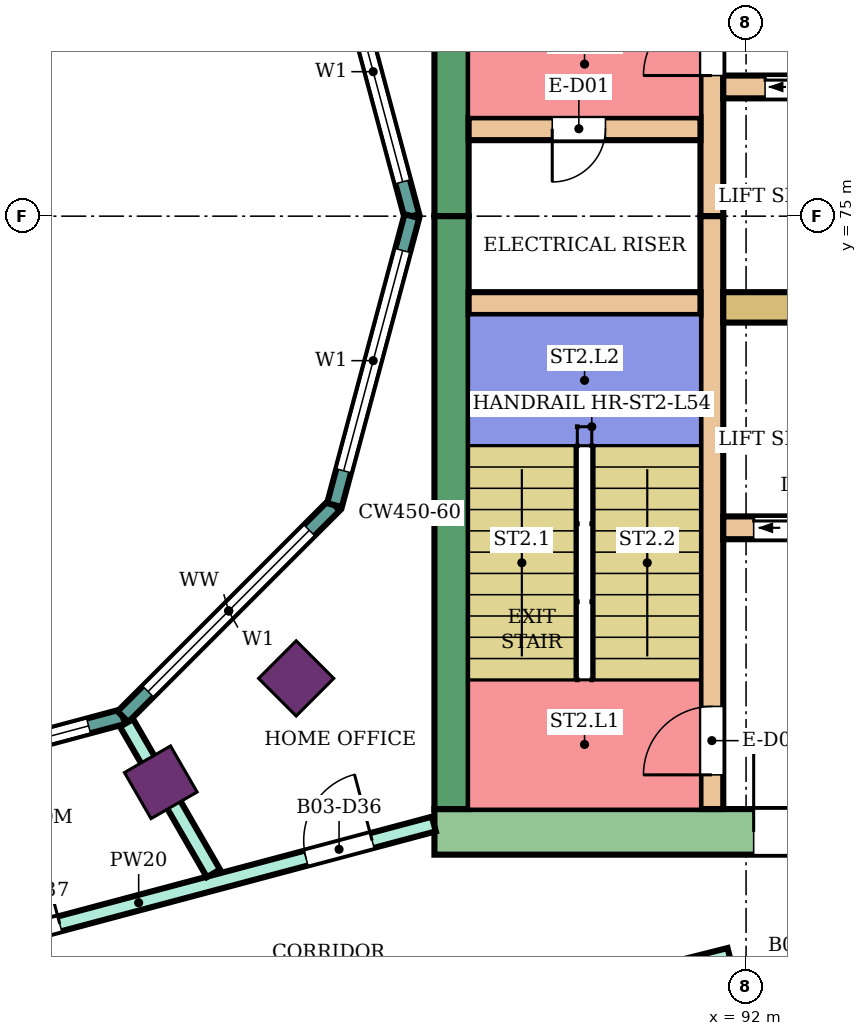
"""IFC4 building model, lengths in metres.
Left out: names, types, materials, properties, quantities, classifications, styles, units other than length and angle.
Written with IfcOpenShell. Run it as: python <this file> out.ifc"""

import sys

from ifc_helpers import new_model, si_unit, direction, frame, frame_2d, origin, origin_2d, place, context, subcontext, project, spatial, rectangle, extrude, element, fill, save


model = new_model("IFC4")
c1 = context("Model", 3, precision=1e-05, world=origin(), true_north=direction((0.0, 1.0)))
c2 = subcontext(c1, "Body", "Model", "MODEL_VIEW")
j1 = project(units=[si_unit("LENGTHUNIT", "METRE"), si_unit("PLANEANGLEUNIT", "RADIAN")], contexts=[c1])
p1 = place(None, origin())
s1 = spatial("IfcSite", under=j1, at=p1, CompositionType="ELEMENT")
p2 = place(p1, origin())
s2 = spatial("IfcBuilding", under=s1, at=p2, CompositionType="ELEMENT")
p3 = place(p2, frame((0.0, 0.0, 237.3)))
s3 = spatial("IfcBuildingStorey", under=s2, at=p3, CompositionType="ELEMENT", Elevation=237.3)
for number, where, z_axis, x_axis in (
    (1, (84.3, 67.552, 0.0), (0.0, 0.0, 1.0), (0.5, -0.866, 0.0)),
    (2, (86.081, 68.919, 0.0), (0.0, 0.0, 1.0), (0.707, -0.707, 0.0)),
):
    element("IfcColumn", number, at=place(p3, frame(where, z_axis=z_axis, x_axis=x_axis)), inside=s3, PredefinedType="COLUMN", context=c2, shape_type="SweptSolid", body=[
        extrude(rectangle(XDim=0.7, YDim=0.7, at=origin_2d()), origin(), (0.0, 0.0, 1.0), 4.2),
    ])
p4 = place(p3, frame((87.9, 66.9, 0.0), z_axis=(0.0, 0.0, 1.0), x_axis=(1.0, 0.0, 0.0)))
e3 = element("IfcWall", 3, at=p4, inside=s3, PredefinedType="SHEAR", context=c2, shape_type="SweptSolid", body=[
    extrude(rectangle(XDim=14.9, YDim=0.6, at=frame_2d((7.45, 0.0))), origin(), (0.0, 0.0, 1.0), 3.88),
])
p5 = place(p4, frame((4.2, 0.0, 0.0)))
e4 = element("IfcOpeningElement", 4, at=p5, cuts=e3, PredefinedType="OPENING", context=c2, shape_type="SweptSolid", body=[
    extrude(rectangle(XDim=2.4, YDim=2.4, at=frame_2d((1.2, 1.2))), frame((0.0, 0.31, 0.0), z_axis=(0.0, -1.0, 0.0), x_axis=(1.0, 0.0, 0.0)), (0.0, 0.0, 1.0), 0.62),
])
for number, where, z_axis, x_axis in (
    (5, (88.125, 75.0, 0.0), (0.0, 0.0, 1.0), (0.0, 1.0, 0.0)),
    (6, (88.125, 67.2, 0.0), (0.0, 0.0, 1.0), (0.0, 1.0, 0.0)),
):
    element("IfcWall", number, at=place(p3, frame(where, z_axis=z_axis, x_axis=x_axis)), inside=s3, PredefinedType="SHEAR", context=c2, shape_type="SweptSolid", body=[
        extrude(rectangle(XDim=7.8, YDim=0.45, at=frame_2d((3.9, 0.0))), origin(), (0.0, 0.0, 1.0), 3.88),
    ])
p6 = place(p3, frame((91.55, 75.0, 0.0), z_axis=(0.0, 0.0, 1.0), x_axis=(0.0, 1.0, 0.0)))
e7 = element("IfcWall", 7, at=p6, inside=s3, PredefinedType="SHEAR", context=c2, shape_type="SweptSolid", body=[
    extrude(rectangle(XDim=7.8, YDim=0.3, at=frame_2d((3.9, 0.0))), origin(), (0.0, 0.0, 1.0), 3.88),
])
p7 = place(p6, frame((1.85, 0.0, 0.0)))
e8 = element("IfcOpeningElement", 8, at=p7, cuts=e7, PredefinedType="OPENING", context=c2, shape_type="SweptSolid", body=[
    extrude(rectangle(XDim=0.9, YDim=2.1, at=frame_2d((0.45, 1.05))), frame((0.0, 0.16, 0.0), z_axis=(0.0, -1.0, 0.0), x_axis=(1.0, 0.0, 0.0)), (0.0, 0.0, 1.0), 0.32),
])
p8 = place(p3, frame((91.55, 67.2, 0.0), z_axis=(0.0, 0.0, 1.0), x_axis=(0.0, 1.0, 0.0)))
e9 = element("IfcWall", 9, at=p8, inside=s3, PredefinedType="SHEAR", context=c2, shape_type="SweptSolid", body=[
    extrude(rectangle(XDim=7.8, YDim=0.3, at=frame_2d((3.9, 0.0))), origin(), (0.0, 0.0, 1.0), 3.88),
])
p9 = place(p8, frame((0.45, 0.0, 0.0)))
e10 = element("IfcOpeningElement", 10, at=p9, cuts=e9, PredefinedType="OPENING", context=c2, shape_type="SweptSolid", body=[
    extrude(rectangle(XDim=0.9, YDim=2.1, at=frame_2d((0.45, 1.05))), frame((0.0, 0.16, 0.0), z_axis=(0.0, -1.0, 0.0), x_axis=(1.0, 0.0, 0.0)), (0.0, 0.0, 1.0), 0.32),
])
p10 = place(p3, frame((88.35, 76.15, 0.0), z_axis=(0.0, 0.0, 1.0), x_axis=(1.0, 0.0, 0.0)))
e11 = element("IfcWall", 11, at=p10, inside=s3, PredefinedType="SHEAR", context=c2, shape_type="SweptSolid", body=[
    extrude(rectangle(XDim=3.05, YDim=0.3, at=frame_2d((1.525, 0.0))), origin(), (0.0, 0.0, 1.0), 3.88),
])
p11 = place(p10, frame((1.1, 0.0, 0.0)))
e12 = element("IfcOpeningElement", 12, at=p11, cuts=e11, PredefinedType="OPENING", context=c2, shape_type="SweptSolid", body=[
    extrude(rectangle(XDim=0.7, YDim=2.0, at=frame_2d((0.35, 1.0))), frame((0.0, 0.16, 0.0), z_axis=(0.0, -1.0, 0.0), x_axis=(1.0, 0.0, 0.0)), (0.0, 0.0, 1.0), 0.32),
])
p12 = place(p3, frame((88.35, 73.85, 0.0), z_axis=(0.0, 0.0, 1.0), x_axis=(1.0, 0.0, 0.0)))
e13 = element("IfcWall", 13, at=p12, inside=s3, PredefinedType="SHEAR", context=c2, shape_type="SweptSolid", body=[
    extrude(rectangle(XDim=3.05, YDim=0.3, at=frame_2d((1.525, 0.0))), origin(), (0.0, 0.0, 1.0), 3.88),
])
p13 = place(p3, frame((91.7, 76.7, 0.0), z_axis=(0.0, 0.0, 1.0), x_axis=(1.0, 0.0, 0.0)))
e14 = element("IfcWall", 14, at=p13, inside=s3, PredefinedType="SHEAR", context=c2, shape_type="SweptSolid", body=[
    extrude(rectangle(XDim=11.1, YDim=0.3, at=frame_2d((5.55, 0.0))), origin(), (0.0, 0.0, 1.0), 3.88),
])
p14 = place(p13, frame((0.55, 0.0, 0.0)))
e15 = element("IfcOpeningElement", 15, at=p14, cuts=e14, PredefinedType="OPENING", context=c2, shape_type="SweptSolid", body=[
    extrude(rectangle(XDim=1.1, YDim=2.1, at=frame_2d((0.55, 1.05))), frame((0.0, 0.16, 0.0), z_axis=(0.0, -1.0, 0.0), x_axis=(1.0, 0.0, 0.0)), (0.0, 0.0, 1.0), 0.32),
])
p15 = place(p13, frame((3.0, 0.0, 0.0)))
e16 = element("IfcOpeningElement", 16, at=p15, cuts=e14, PredefinedType="OPENING", context=c2, shape_type="SweptSolid", body=[
    extrude(rectangle(XDim=1.2, YDim=2.1, at=frame_2d((0.6, 1.05))), frame((0.0, 0.16, 0.0), z_axis=(0.0, -1.0, 0.0), x_axis=(1.0, 0.0, 0.0)), (0.0, 0.0, 1.0), 0.32),
])
p16 = place(p13, frame((5.5, 0.0, 0.0)))
e17 = element("IfcOpeningElement", 17, at=p16, cuts=e14, PredefinedType="OPENING", context=c2, shape_type="SweptSolid", body=[
    extrude(rectangle(XDim=1.2, YDim=2.1, at=frame_2d((0.6, 1.05))), frame((0.0, 0.16, 0.0), z_axis=(0.0, -1.0, 0.0), x_axis=(1.0, 0.0, 0.0)), (0.0, 0.0, 1.0), 0.32),
])
p17 = place(p13, frame((7.95, 0.0, 0.0)))
e18 = element("IfcOpeningElement", 18, at=p17, cuts=e14, PredefinedType="OPENING", context=c2, shape_type="SweptSolid", body=[
    extrude(rectangle(XDim=0.9, YDim=2.1, at=frame_2d((0.45, 1.05))), frame((0.0, 0.16, 0.0), z_axis=(0.0, -1.0, 0.0), x_axis=(1.0, 0.0, 0.0)), (0.0, 0.0, 1.0), 0.32),
])
p18 = place(p13, frame((9.75, 0.0, 0.0)))
e19 = element("IfcOpeningElement", 19, at=p18, cuts=e14, PredefinedType="OPENING", context=c2, shape_type="SweptSolid", body=[
    extrude(rectangle(XDim=0.9, YDim=2.1, at=frame_2d((0.45, 1.05))), frame((0.0, 0.16, 0.0), z_axis=(0.0, -1.0, 0.0), x_axis=(1.0, 0.0, 0.0)), (0.0, 0.0, 1.0), 0.32),
])
p19 = place(p3, frame((91.7, 73.8, 0.0), z_axis=(0.0, 0.0, 1.0), x_axis=(1.0, 0.0, 0.0)))
e20 = element("IfcWall", 20, at=p19, inside=s3, PredefinedType="SHEAR", context=c2, shape_type="SweptSolid", body=[
    extrude(rectangle(XDim=11.1, YDim=0.4, at=frame_2d((5.55, 0.0))), origin(), (0.0, 0.0, 1.0), 3.88),
])
p20 = place(p3, frame((91.7, 70.9, 0.0), z_axis=(0.0, 0.0, 1.0), x_axis=(1.0, 0.0, 0.0)))
e21 = element("IfcWall", 21, at=p20, inside=s3, PredefinedType="SHEAR", context=c2, shape_type="SweptSolid", body=[
    extrude(rectangle(XDim=11.1, YDim=0.3, at=frame_2d((5.55, 0.0))), origin(), (0.0, 0.0, 1.0), 3.88),
])
p21 = place(p20, frame((0.4, 0.0, 0.0)))
e22 = element("IfcOpeningElement", 22, at=p21, cuts=e21, PredefinedType="OPENING", context=c2, shape_type="SweptSolid", body=[
    extrude(rectangle(XDim=1.4, YDim=2.1, at=frame_2d((0.7, 1.05))), frame((0.0, 0.16, 0.0), z_axis=(0.0, -1.0, 0.0), x_axis=(1.0, 0.0, 0.0)), (0.0, 0.0, 1.0), 0.32),
])
p22 = place(p20, frame((3.0, 0.0, 0.0)))
e23 = element("IfcOpeningElement", 23, at=p22, cuts=e21, PredefinedType="OPENING", context=c2, shape_type="SweptSolid", body=[
    extrude(rectangle(XDim=1.2, YDim=2.1, at=frame_2d((0.6, 1.05))), frame((0.0, 0.16, 0.0), z_axis=(0.0, -1.0, 0.0), x_axis=(1.0, 0.0, 0.0)), (0.0, 0.0, 1.0), 0.32),
])
p23 = place(p20, frame((6.075, 0.0, 0.0)))
e24 = element("IfcOpeningElement", 24, at=p23, cuts=e21, PredefinedType="OPENING", context=c2, shape_type="SweptSolid", body=[
    extrude(rectangle(XDim=0.9, YDim=2.1, at=frame_2d((0.45, 1.05))), frame((0.0, 0.16, 0.0), z_axis=(0.0, -1.0, 0.0), x_axis=(1.0, 0.0, 0.0)), (0.0, 0.0, 1.0), 0.32),
])
p24 = place(p20, frame((9.125, 0.0, 0.0)))
e25 = element("IfcOpeningElement", 25, at=p24, cuts=e21, PredefinedType="OPENING", context=c2, shape_type="SweptSolid", body=[
    extrude(rectangle(XDim=0.9, YDim=2.1, at=frame_2d((0.45, 1.05))), frame((0.0, 0.16, 0.0), z_axis=(0.0, -1.0, 0.0), x_axis=(1.0, 0.0, 0.0)), (0.0, 0.0, 1.0), 0.32),
])
p25 = place(p3, frame((87.604, 75.0, 0.0), z_axis=(0.0, 0.0, 1.0), x_axis=(-0.258789828301, 0.965933654434, 0.0)))
e26 = element("IfcWall", 26, at=p25, inside=s3, PredefinedType="NOTDEFINED", context=c2, shape_type="SweptSolid", body=[
    extrude(rectangle(XDim=3.936, YDim=0.2, at=frame_2d((1.968, 0.0))), origin(), (0.0, 0.0, 1.0), 4.2),
])
p26 = place(p25, frame((0.468, 0.0, 0.9)))
e27 = element("IfcOpeningElement", 27, at=p26, cuts=e26, PredefinedType="OPENING", context=c2, shape_type="SweptSolid", body=[
    extrude(rectangle(XDim=3.0, YDim=2.3, at=frame_2d((1.5, 1.15))), frame((0.0, 0.11, 0.0), z_axis=(0.0, -1.0, 0.0), x_axis=(1.0, 0.0, 0.0)), (0.0, 0.0, 1.0), 0.22),
])
p27 = place(p3, frame((80.0, 67.396, 0.0), z_axis=(0.0, 0.0, 1.0), x_axis=(0.965933654434, 0.258789828301, 0.0)))
e28 = element("IfcWall", 28, at=p27, inside=s3, PredefinedType="NOTDEFINED", context=c2, shape_type="SweptSolid", body=[
    extrude(rectangle(XDim=3.936, YDim=0.2, at=frame_2d((1.968, 0.0))), origin(), (0.0, 0.0, 1.0), 4.2),
])
p28 = place(p27, frame((0.468, 0.0, 0.9)))
e29 = element("IfcOpeningElement", 29, at=p28, cuts=e28, PredefinedType="OPENING", context=c2, shape_type="SweptSolid", body=[
    extrude(rectangle(XDim=3.0, YDim=2.3, at=frame_2d((1.5, 1.15))), frame((0.0, 0.11, 0.0), z_axis=(0.0, -1.0, 0.0), x_axis=(1.0, 0.0, 0.0)), (0.0, 0.0, 1.0), 0.22),
])
p29 = place(p3, frame((83.802, 68.415, 0.0), z_axis=(0.0, 0.0, 1.0), x_axis=(0.707106781187, 0.707106781187, 0.0)))
e30 = element("IfcWall", 30, at=p29, inside=s3, PredefinedType="NOTDEFINED", context=c2, shape_type="SweptSolid", body=[
    extrude(rectangle(XDim=3.936, YDim=0.2, at=frame_2d((1.968, 0.0))), origin(), (0.0, 0.0, 1.0), 4.2),
])
p30 = place(p29, frame((0.468, 0.0, 0.9)))
e31 = element("IfcOpeningElement", 31, at=p30, cuts=e30, PredefinedType="OPENING", context=c2, shape_type="SweptSolid", body=[
    extrude(rectangle(XDim=3.0, YDim=2.3, at=frame_2d((1.5, 1.15))), frame((0.0, 0.11, 0.0), z_axis=(0.0, -1.0, 0.0), x_axis=(1.0, 0.0, 0.0)), (0.0, 0.0, 1.0), 0.22),
])
p31 = place(p3, frame((86.585, 71.198, 0.0), z_axis=(0.0, 0.0, 1.0), x_axis=(0.258789828301, 0.965933654434, 0.0)))
e32 = element("IfcWall", 32, at=p31, inside=s3, PredefinedType="NOTDEFINED", context=c2, shape_type="SweptSolid", body=[
    extrude(rectangle(XDim=3.936, YDim=0.2, at=frame_2d((1.968, 0.0))), origin(), (0.0, 0.0, 1.0), 4.2),
])
p32 = place(p31, frame((0.468, 0.0, 0.9)))
e33 = element("IfcOpeningElement", 33, at=p32, cuts=e32, PredefinedType="OPENING", context=c2, shape_type="SweptSolid", body=[
    extrude(rectangle(XDim=3.0, YDim=2.3, at=frame_2d((1.5, 1.15))), frame((0.0, 0.11, 0.0), z_axis=(0.0, -1.0, 0.0), x_axis=(1.0, 0.0, 0.0)), (0.0, 0.0, 1.0), 0.22),
])
p33 = place(p3, frame((80.125, 64.932, 0.0), z_axis=(0.0, 0.0, 1.0), x_axis=(0.966236955806, 0.257655089674, 0.0)))
e34 = element("IfcWall", 34, at=p33, inside=s3, PredefinedType="PARTITIONING", context=c2, shape_type="SweptSolid", body=[
    extrude(rectangle(XDim=8.039, YDim=0.2, at=frame_2d((4.02, 0.0))), origin(), (0.0, 0.0, 1.0), 3.75),
])
p34 = place(p33, frame((6.298, 0.0, 0.0)))
e35 = element("IfcOpeningElement", 35, at=p34, cuts=e34, PredefinedType="OPENING", context=c2, shape_type="SweptSolid", body=[
    extrude(rectangle(XDim=0.9, YDim=2.1, at=frame_2d((0.45, 1.05))), frame((0.0, 0.11, 0.0), z_axis=(0.0, -1.0, 0.0), x_axis=(1.0, 0.0, 0.0)), (0.0, 0.0, 1.0), 0.22),
])
p35 = place(p33, frame((2.045, 0.0, 0.0)))
e36 = element("IfcOpeningElement", 36, at=p35, cuts=e34, PredefinedType="OPENING", context=c2, shape_type="SweptSolid", body=[
    extrude(rectangle(XDim=0.9, YDim=2.1, at=frame_2d((0.45, 1.05))), frame((0.0, 0.11, 0.0), z_axis=(0.0, -1.0, 0.0), x_axis=(1.0, 0.0, 0.0)), (0.0, 0.0, 1.0), 0.22),
])
p36 = place(p3, frame((83.85, 68.333, 0.0), z_axis=(0.0, 0.0, 1.0), x_axis=(0.500080019051, -0.865979199835, 0.0)))
e37 = element("IfcWall", 37, at=p36, inside=s3, PredefinedType="PARTITIONING", context=c2, shape_type="SweptSolid", body=[
    extrude(rectangle(XDim=2.285, YDim=0.2, at=frame_2d((1.143, 0.0))), origin(), (0.0, 0.0, 1.0), 3.75),
])
p37 = place(p3, frame((86.053, 63.826, 0.0), z_axis=(0.0, 0.0, 1.0), x_axis=(0.969490004987, 0.245130843083, 0.0)))
e38 = element("IfcWall", 38, at=p37, inside=s3, PredefinedType="PARTITIONING", context=c2, shape_type="SweptSolid", body=[
    extrude(rectangle(XDim=5.908, YDim=0.2, at=frame_2d((2.954, 0.0))), origin(), (0.0, 0.0, 1.0), 3.75),
])
p38 = place(p26, origin())
e39 = element("IfcWindow", 39, at=p38, inside=s3, PartitioningType="SINGLE_PANEL", PredefinedType="WINDOW", context=c2, shape_type="SweptSolid", body=[
    extrude(rectangle(XDim=3.0, YDim=2.3, at=frame_2d((1.5, 1.15))), frame((0.0, 0.03, 0.0), z_axis=(0.0, -1.0, 0.0), x_axis=(1.0, 0.0, 0.0)), (0.0, 0.0, 1.0), 0.06),
])
fill(e27, e39)
p39 = place(p28, origin())
e40 = element("IfcWindow", 40, at=p39, inside=s3, PartitioningType="SINGLE_PANEL", PredefinedType="WINDOW", context=c2, shape_type="SweptSolid", body=[
    extrude(rectangle(XDim=3.0, YDim=2.3, at=frame_2d((1.5, 1.15))), frame((0.0, 0.03, 0.0), z_axis=(0.0, -1.0, 0.0), x_axis=(1.0, 0.0, 0.0)), (0.0, 0.0, 1.0), 0.06),
])
fill(e29, e40)
p40 = place(p30, origin())
e41 = element("IfcWindow", 41, at=p40, inside=s3, PartitioningType="SINGLE_PANEL", PredefinedType="WINDOW", context=c2, shape_type="SweptSolid", body=[
    extrude(rectangle(XDim=3.0, YDim=2.3, at=frame_2d((1.5, 1.15))), frame((0.0, 0.03, 0.0), z_axis=(0.0, -1.0, 0.0), x_axis=(1.0, 0.0, 0.0)), (0.0, 0.0, 1.0), 0.06),
])
fill(e31, e41)
p41 = place(p32, origin())
e42 = element("IfcWindow", 42, at=p41, inside=s3, PartitioningType="SINGLE_PANEL", PredefinedType="WINDOW", context=c2, shape_type="SweptSolid", body=[
    extrude(rectangle(XDim=3.0, YDim=2.3, at=frame_2d((1.5, 1.15))), frame((0.0, 0.03, 0.0), z_axis=(0.0, -1.0, 0.0), x_axis=(1.0, 0.0, 0.0)), (0.0, 0.0, 1.0), 0.06),
])
fill(e33, e42)
p42 = place(p34, origin())
e43 = element("IfcDoor", 43, at=p42, inside=s3, OperationType="SINGLE_SWING_RIGHT", PredefinedType="DOOR", context=c2, shape_type="SweptSolid", body=[
    extrude(rectangle(XDim=0.9, YDim=2.1, at=frame_2d((0.45, 1.05))), frame((0.0, 0.025, 0.0), z_axis=(0.0, -1.0, 0.0), x_axis=(1.0, 0.0, 0.0)), (0.0, 0.0, 1.0), 0.05),
])
fill(e35, e43)
p43 = place(p35, origin())
e44 = element("IfcDoor", 44, at=p43, inside=s3, OperationType="SINGLE_SWING_RIGHT", PredefinedType="DOOR", context=c2, shape_type="SweptSolid", body=[
    extrude(rectangle(XDim=0.9, YDim=2.1, at=frame_2d((0.45, 1.05))), frame((0.0, 0.025, 0.0), z_axis=(0.0, -1.0, 0.0), x_axis=(1.0, 0.0, 0.0)), (0.0, 0.0, 1.0), 0.05),
])
fill(e36, e44)
p44 = place(p11, frame((0.7, 0.0, 0.0), z_axis=(0.0, 0.0, 1.0), x_axis=(-1.0, 0.0, 0.0)))
e45 = element("IfcDoor", 45, at=p44, inside=s3, OperationType="SINGLE_SWING_RIGHT", PredefinedType="DOOR", context=c2, shape_type="SweptSolid", body=[
    extrude(rectangle(XDim=0.7, YDim=2.0, at=frame_2d((0.35, 1.0))), frame((0.0, 0.025, 0.0), z_axis=(0.0, -1.0, 0.0), x_axis=(1.0, 0.0, 0.0)), (0.0, 0.0, 1.0), 0.05),
])
fill(e12, e45)
p45 = place(p7, origin())
e46 = element("IfcDoor", 46, at=p45, inside=s3, OperationType="SINGLE_SWING_LEFT", PredefinedType="DOOR", context=c2, shape_type="SweptSolid", body=[
    extrude(rectangle(XDim=0.9, YDim=2.1, at=frame_2d((0.45, 1.05))), frame((0.0, 0.025, 0.0), z_axis=(0.0, -1.0, 0.0), x_axis=(1.0, 0.0, 0.0)), (0.0, 0.0, 1.0), 0.05),
])
fill(e8, e46)
p46 = place(p9, origin())
e47 = element("IfcDoor", 47, at=p46, inside=s3, OperationType="SINGLE_SWING_LEFT", PredefinedType="DOOR", context=c2, shape_type="SweptSolid", body=[
    extrude(rectangle(XDim=0.9, YDim=2.1, at=frame_2d((0.45, 1.05))), frame((0.0, 0.025, 0.0), z_axis=(0.0, -1.0, 0.0), x_axis=(1.0, 0.0, 0.0)), (0.0, 0.0, 1.0), 0.05),
])
fill(e10, e47)
p47 = place(p14, origin())
e48 = element("IfcDoor", 48, at=p47, inside=s3, OperationType="DOUBLE_DOOR_SLIDING", PredefinedType="DOOR", context=c2, shape_type="SweptSolid", body=[
    extrude(rectangle(XDim=1.1, YDim=2.1, at=frame_2d((0.55, 1.05))), frame((0.0, 0.025, 0.0), z_axis=(0.0, -1.0, 0.0), x_axis=(1.0, 0.0, 0.0)), (0.0, 0.0, 1.0), 0.05),
])
fill(e15, e48)
p48 = place(p21, origin())
e49 = element("IfcDoor", 49, at=p48, inside=s3, OperationType="DOUBLE_DOOR_SLIDING", PredefinedType="DOOR", context=c2, shape_type="SweptSolid", body=[
    extrude(rectangle(XDim=1.4, YDim=2.1, at=frame_2d((0.7, 1.05))), frame((0.0, 0.025, 0.0), z_axis=(0.0, -1.0, 0.0), x_axis=(1.0, 0.0, 0.0)), (0.0, 0.0, 1.0), 0.05),
])
fill(e22, e49)
p49 = place(p5, origin())
e50 = element("IfcDoor", 50, at=p49, inside=s3, OperationType="DOUBLE_DOOR_SINGLE_SWING", PredefinedType="DOOR", context=c2, shape_type="SweptSolid", body=[
    extrude(rectangle(XDim=2.4, YDim=2.4, at=frame_2d((1.2, 1.2))), frame((0.0, 0.025, 0.0), z_axis=(0.0, -1.0, 0.0), x_axis=(1.0, 0.0, 0.0)), (0.0, 0.0, 1.0), 0.05),
])
fill(e4, e50)
save(model, sys.argv[1])
